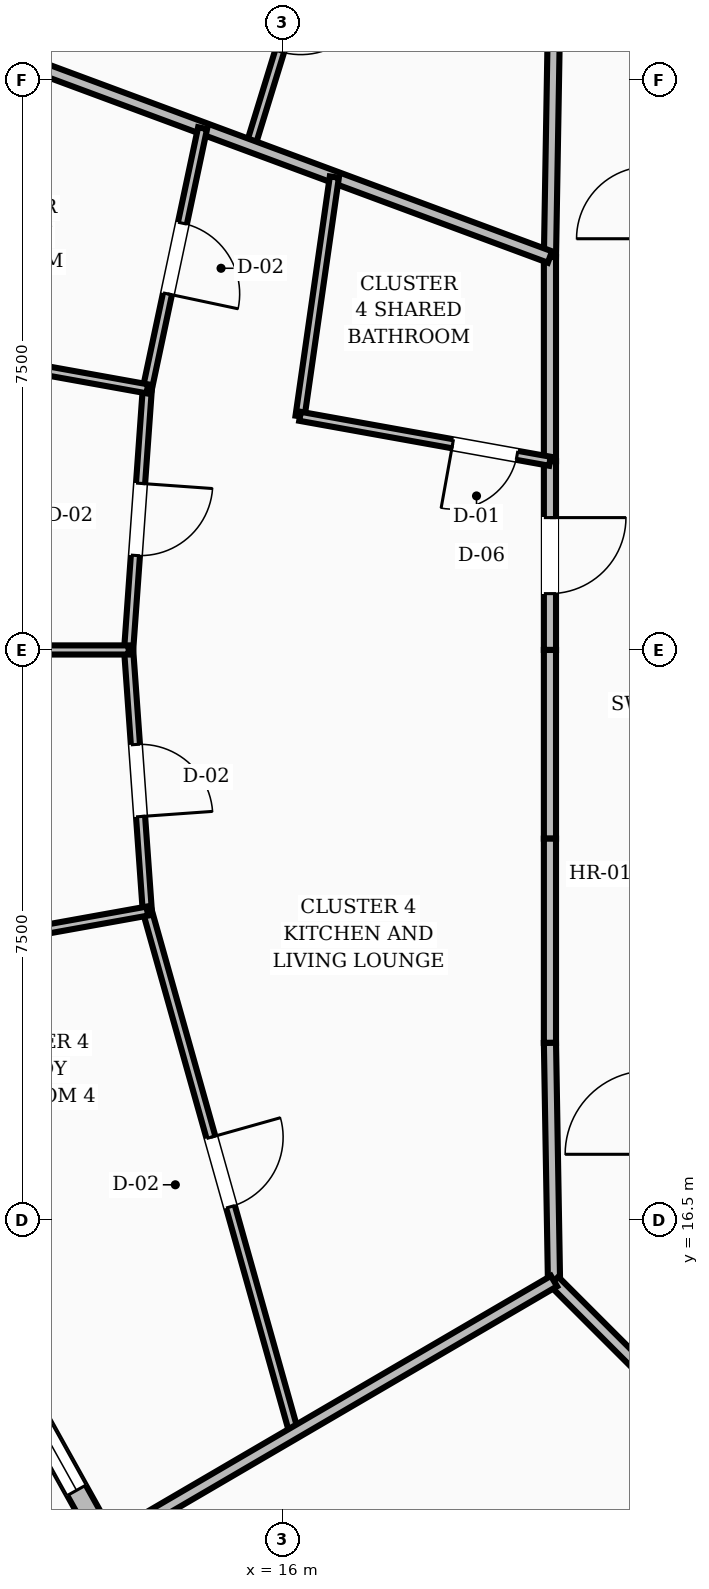
"""IFC4 building model, lengths in metres.
Left out: names, types, materials, properties, quantities, classifications, styles, units other than length and angle.
Written with IfcOpenShell. Run it as: python <this file> out.ifc"""

import sys

from ifc_helpers import new_model, si_unit, direction, frame, frame_2d, origin, place, context, subcontext, project, spatial, rectangle, extrude, element, fill, save


model = new_model("IFC4")
c1 = context("Model", 3, precision=1e-05, world=origin(), true_north=direction((0.0, 1.0)))
c2 = subcontext(c1, "Body", "Model", "MODEL_VIEW")
j1 = project(units=[si_unit("LENGTHUNIT", "METRE"), si_unit("PLANEANGLEUNIT", "RADIAN")], contexts=[c1])
p1 = place(None, origin())
s1 = spatial("IfcSite", under=j1, at=p1, CompositionType="ELEMENT")
p2 = place(p1, origin())
s2 = spatial("IfcBuilding", under=s1, at=p2, CompositionType="ELEMENT")
p3 = place(p2, frame((0.0, 0.0, 236.4)))
s3 = spatial("IfcBuildingStorey", under=s2, at=p3, CompositionType="ELEMENT", Elevation=236.4)
p4 = place(p3, frame((11.641, 15.908, 0.0), z_axis=(0.0, 0.0, 1.0), x_axis=(0.486628377496, -0.873609078602, 0.0)))
e1 = element("IfcWall", 1, at=p4, inside=s3, PredefinedType="STANDARD", context=c2, shape_type="SweptSolid", body=[
    extrude(rectangle(XDim=4.185, YDim=0.28, at=frame_2d((2.092, 0.0))), origin(), (0.0, 0.0, 1.0), 2.88),
])
p5 = place(p4, frame((0.792, 0.0, 0.8)))
e2 = element("IfcOpeningElement", 2, at=p5, cuts=e1, PredefinedType="OPENING", context=c2, shape_type="SweptSolid", body=[
    extrude(rectangle(XDim=2.6, YDim=1.65, at=frame_2d((1.3, 0.825))), frame((0.0, 0.15, 0.0), z_axis=(0.0, -1.0, 0.0), x_axis=(1.0, 0.0, 0.0)), (0.0, 0.0, 1.0), 0.3),
])
p6 = place(p3, frame((19.573, 32.303, 0.0), z_axis=(0.0, 0.0, 1.0), x_axis=(-0.016981035134, -0.999855811828, 0.0)))
e3 = element("IfcWall", 3, at=p6, inside=s3, PredefinedType="SOLIDWALL", context=c2, shape_type="SweptSolid", body=[
    extrude(rectangle(XDim=3.134, YDim=0.16, at=frame_2d((1.567, 0.0))), origin(), (0.0, 0.0, 1.0), 2.87),
])
p7 = place(p3, frame((19.52, 29.169, 0.0), z_axis=(0.0, 0.0, 1.0), x_axis=(0.0, -1.0, 0.0)))
e4 = element("IfcWall", 4, at=p7, inside=s3, PredefinedType="SOLIDWALL", context=c2, shape_type="SweptSolid", body=[
    extrude(rectangle(XDim=2.687, YDim=0.16, at=frame_2d((1.344, 0.0))), origin(), (0.0, 0.0, 1.0), 2.87),
])
p8 = place(p3, frame((19.52, 26.482, 0.0), z_axis=(0.0, 0.0, 1.0), x_axis=(0.0, -1.0, 0.0)))
e5 = element("IfcWall", 5, at=p8, inside=s3, PredefinedType="SOLIDWALL", context=c2, shape_type="SweptSolid", body=[
    extrude(rectangle(XDim=2.482, YDim=0.16, at=frame_2d((1.241, 0.0))), origin(), (0.0, 0.0, 1.0), 2.87),
])
p9 = place(p8, frame((0.741, 0.0, 0.0)))
e6 = element("IfcOpeningElement", 6, at=p9, cuts=e5, PredefinedType="OPENING", context=c2, shape_type="SweptSolid", body=[
    extrude(rectangle(XDim=1.0, YDim=2.1, at=frame_2d((0.5, 1.05))), frame((0.0, 0.09, 0.0), z_axis=(0.0, -1.0, 0.0), x_axis=(1.0, 0.0, 0.0)), (0.0, 0.0, 1.0), 0.18),
])
p10 = place(p3, frame((19.52, 24.0, 0.0), z_axis=(0.0, 0.0, 1.0), x_axis=(0.0, -1.0, 0.0)))
e7 = element("IfcWall", 7, at=p10, inside=s3, PredefinedType="SOLIDWALL", context=c2, shape_type="SweptSolid", body=[
    extrude(rectangle(XDim=2.482, YDim=0.16, at=frame_2d((1.241, 0.0))), origin(), (0.0, 0.0, 1.0), 2.87),
])
p11 = place(p3, frame((19.52, 21.518, 0.0), z_axis=(0.0, 0.0, 1.0), x_axis=(0.0, -1.0, 0.0)))
e8 = element("IfcWall", 8, at=p11, inside=s3, PredefinedType="SOLIDWALL", context=c2, shape_type="SweptSolid", body=[
    extrude(rectangle(XDim=2.687, YDim=0.16, at=frame_2d((1.344, 0.0))), origin(), (0.0, 0.0, 1.0), 2.87),
])
p12 = place(p3, frame((19.52, 18.831, 0.0), z_axis=(0.0, 0.0, 1.0), x_axis=(0.016981035134, -0.999855811828, 0.0)))
e9 = element("IfcWall", 9, at=p12, inside=s3, PredefinedType="SOLIDWALL", context=c2, shape_type="SweptSolid", body=[
    extrude(rectangle(XDim=3.134, YDim=0.16, at=frame_2d((1.567, 0.0))), origin(), (0.0, 0.0, 1.0), 2.87),
])
p13 = place(p3, frame((19.573, 15.697, 0.0), z_axis=(0.0, 0.0, 1.0), x_axis=(0.707106781187, -0.707106781187, 0.0)))
e10 = element("IfcWall", 10, at=p13, inside=s3, PredefinedType="SOLIDWALL", context=c2, shape_type="SweptSolid", body=[
    extrude(rectangle(XDim=2.916, YDim=0.16, at=frame_2d((1.458, 0.0))), origin(), (0.0, 0.0, 1.0), 2.87),
])
p14 = place(p3, frame((16.625, 34.026, 0.0), z_axis=(0.0, 0.0, 1.0), x_axis=(-0.294182446775, -0.955749280936, 0.0)))
e11 = element("IfcWall", 11, at=p14, inside=s3, PredefinedType="PARTITIONING", context=c2, shape_type="SweptSolid", body=[
    extrude(rectangle(XDim=3.552, YDim=0.12, at=frame_2d((1.776, 0.0))), origin(), (0.0, 0.0, 1.0), 2.87),
])
p15 = place(p14, frame((1.301, 0.0, 0.0)))
e12 = element("IfcOpeningElement", 12, at=p15, cuts=e11, PredefinedType="OPENING", context=c2, shape_type="SweptSolid", body=[
    extrude(rectangle(XDim=0.95, YDim=2.1, at=frame_2d((0.475, 1.05))), frame((0.0, 0.07, 0.0), z_axis=(0.0, -1.0, 0.0), x_axis=(1.0, 0.0, 0.0)), (0.0, 0.0, 1.0), 0.14),
])
p16 = place(p3, frame((19.52, 29.169, 0.0), z_axis=(0.0, 0.0, 1.0), x_axis=(-0.93756283665, 0.347815938871, 0.0)))
e13 = element("IfcWall", 13, at=p16, inside=s3, PredefinedType="SOLIDWALL", context=c2, shape_type="SweptSolid", body=[
    extrude(rectangle(XDim=8.354, YDim=0.16, at=frame_2d((4.177, 0.0))), origin(), (0.0, 0.0, 1.0), 2.87),
])
p17 = place(p3, frame((16.684, 30.222, 0.0), z_axis=(0.0, 0.0, 1.0), x_axis=(-0.141958767182, -0.989872571809, 0.0)))
e14 = element("IfcWall", 14, at=p17, inside=s3, PredefinedType="PARTITIONING", context=c2, shape_type="SweptSolid", body=[
    extrude(rectangle(XDim=3.18, YDim=0.12, at=frame_2d((1.59, 0.0))), origin(), (0.0, 0.0, 1.0), 2.87),
])
p18 = place(p3, frame((19.52, 26.482, 0.0), z_axis=(0.0, 0.0, 1.0), x_axis=(-0.984196827571, 0.177077961922, 0.0)))
e15 = element("IfcWall", 15, at=p18, inside=s3, PredefinedType="PARTITIONING", context=c2, shape_type="SweptSolid", body=[
    extrude(rectangle(XDim=3.341, YDim=0.12, at=frame_2d((1.67, 0.0))), origin(), (0.0, 0.0, 1.0), 2.87),
])
p19 = place(p18, frame((0.44, 0.0, 0.0)))
e16 = element("IfcOpeningElement", 16, at=p19, cuts=e15, PredefinedType="OPENING", context=c2, shape_type="SweptSolid", body=[
    extrude(rectangle(XDim=0.86, YDim=2.1, at=frame_2d((0.43, 1.05))), frame((0.0, 0.07, 0.0), z_axis=(0.0, -1.0, 0.0), x_axis=(1.0, 0.0, 0.0)), (0.0, 0.0, 1.0), 0.14),
])
p20 = place(p3, frame((14.95, 30.865, 0.0), z_axis=(0.0, 0.0, 1.0), x_axis=(-0.207459780038, -0.978243548237, 0.0)))
e17 = element("IfcWall", 17, at=p20, inside=s3, PredefinedType="PARTITIONING", context=c2, shape_type="SweptSolid", body=[
    extrude(rectangle(XDim=3.506, YDim=0.12, at=frame_2d((1.753, 0.0))), origin(), (0.0, 0.0, 1.0), 2.87),
])
p21 = place(p20, frame((1.278, 0.0, 0.0)))
e18 = element("IfcOpeningElement", 18, at=p21, cuts=e17, PredefinedType="OPENING", context=c2, shape_type="SweptSolid", body=[
    extrude(rectangle(XDim=0.95, YDim=2.1, at=frame_2d((0.475, 1.05))), frame((0.0, 0.07, 0.0), z_axis=(0.0, -1.0, 0.0), x_axis=(1.0, 0.0, 0.0)), (0.0, 0.0, 1.0), 0.14),
])
p22 = place(p3, frame((14.223, 27.435, 0.0), z_axis=(0.0, 0.0, 1.0), x_axis=(-0.071312539547, -0.997454019844, 0.0)))
e19 = element("IfcWall", 19, at=p22, inside=s3, PredefinedType="PARTITIONING", context=c2, shape_type="SweptSolid", body=[
    extrude(rectangle(XDim=3.444, YDim=0.12, at=frame_2d((1.722, 0.0))), origin(), (0.0, 0.0, 1.0), 2.87),
])
p23 = place(p22, frame((1.247, 0.0, 0.0)))
e20 = element("IfcOpeningElement", 20, at=p23, cuts=e19, PredefinedType="OPENING", context=c2, shape_type="SweptSolid", body=[
    extrude(rectangle(XDim=0.95, YDim=2.1, at=frame_2d((0.475, 1.05))), frame((0.0, 0.07, 0.0), z_axis=(0.0, -1.0, 0.0), x_axis=(1.0, 0.0, 0.0)), (0.0, 0.0, 1.0), 0.14),
])
p24 = place(p3, frame((14.223, 27.435, 0.0), z_axis=(0.0, 0.0, 1.0), x_axis=(-0.984203232283, 0.177042360933, 0.0)))
e21 = element("IfcWall", 21, at=p24, inside=s3, PredefinedType="PARTITIONING", context=c2, shape_type="SweptSolid", body=[
    extrude(rectangle(XDim=3.847, YDim=0.12, at=frame_2d((1.924, 0.0))), origin(), (0.0, 0.0, 1.0), 2.87),
])
p25 = place(p3, frame((13.977, 24.0, 0.0), z_axis=(0.0, 0.0, 1.0), x_axis=(0.071312539547, -0.997454019844, 0.0)))
e22 = element("IfcWall", 22, at=p25, inside=s3, PredefinedType="PARTITIONING", context=c2, shape_type="SweptSolid", body=[
    extrude(rectangle(XDim=3.444, YDim=0.12, at=frame_2d((1.722, 0.0))), origin(), (0.0, 0.0, 1.0), 2.87),
])
p26 = place(p25, frame((1.247, 0.0, 0.0)))
e23 = element("IfcOpeningElement", 23, at=p26, cuts=e22, PredefinedType="OPENING", context=c2, shape_type="SweptSolid", body=[
    extrude(rectangle(XDim=0.95, YDim=2.1, at=frame_2d((0.475, 1.05))), frame((0.0, 0.07, 0.0), z_axis=(0.0, -1.0, 0.0), x_axis=(1.0, 0.0, 0.0)), (0.0, 0.0, 1.0), 0.14),
])
p27 = place(p3, frame((13.977, 24.0, 0.0), z_axis=(0.0, 0.0, 1.0), x_axis=(-1.0, 0.0, 0.0)))
e24 = element("IfcWall", 24, at=p27, inside=s3, PredefinedType="PARTITIONING", context=c2, shape_type="SweptSolid", body=[
    extrude(rectangle(XDim=3.964, YDim=0.12, at=frame_2d((1.982, 0.0))), origin(), (0.0, 0.0, 1.0), 2.87),
])
p28 = place(p3, frame((14.223, 20.565, 0.0), z_axis=(0.0, 0.0, 1.0), x_axis=(0.270726742506, -0.962656237134, 0.0)))
e25 = element("IfcWall", 25, at=p28, inside=s3, PredefinedType="PARTITIONING", context=c2, shape_type="SweptSolid", body=[
    extrude(rectangle(XDim=7.132, YDim=0.12, at=frame_2d((3.566, 0.0))), origin(), (0.0, 0.0, 1.0), 2.87),
])
p29 = place(p28, frame((3.091, 0.0, 0.0)))
e26 = element("IfcOpeningElement", 26, at=p29, cuts=e25, PredefinedType="OPENING", context=c2, shape_type="SweptSolid", body=[
    extrude(rectangle(XDim=0.95, YDim=2.1, at=frame_2d((0.475, 1.05))), frame((0.0, 0.07, 0.0), z_axis=(0.0, -1.0, 0.0), x_axis=(1.0, 0.0, 0.0)), (0.0, 0.0, 1.0), 0.14),
])
p30 = place(p3, frame((14.223, 20.565, 0.0), z_axis=(0.0, 0.0, 1.0), x_axis=(-0.984203232283, -0.177042360933, 0.0)))
e27 = element("IfcWall", 27, at=p30, inside=s3, PredefinedType="PARTITIONING", context=c2, shape_type="SweptSolid", body=[
    extrude(rectangle(XDim=3.847, YDim=0.12, at=frame_2d((1.924, 0.0))), origin(), (0.0, 0.0, 1.0), 2.87),
])
p31 = place(p3, frame((19.573, 15.697, 0.0), z_axis=(0.0, 0.0, 1.0), x_axis=(-0.863412899141, -0.504497934185, 0.0)))
e28 = element("IfcWall", 28, at=p31, inside=s3, PredefinedType="SOLIDWALL", context=c2, shape_type="SweptSolid", body=[
    extrude(rectangle(XDim=6.778, YDim=0.16, at=frame_2d((3.389, 0.0))), origin(), (0.0, 0.0, 1.0), 2.87),
])
p32 = place(p5, origin())
e29 = element("IfcWindow", 29, at=p32, inside=s3, PartitioningType="SINGLE_PANEL", PredefinedType="WINDOW", context=c2, shape_type="SweptSolid", body=[
    extrude(rectangle(XDim=2.6, YDim=1.65, at=frame_2d((1.3, 0.825))), frame((0.0, 0.03, 0.0), z_axis=(0.0, -1.0, 0.0), x_axis=(1.0, 0.0, 0.0)), (0.0, 0.0, 1.0), 0.06),
])
fill(e2, e29)
p33 = place(p19, origin())
e30 = element("IfcDoor", 30, at=p33, inside=s3, OperationType="SINGLE_SWING_RIGHT", PredefinedType="DOOR", context=c2, shape_type="SweptSolid", body=[
    extrude(rectangle(XDim=0.86, YDim=2.1, at=frame_2d((0.43, 1.05))), frame((0.0, 0.025, 0.0), z_axis=(0.0, -1.0, 0.0), x_axis=(1.0, 0.0, 0.0)), (0.0, 0.0, 1.0), 0.05),
])
fill(e16, e30)
p34 = place(p9, origin())
e31 = element("IfcDoor", 31, at=p34, inside=s3, OperationType="SINGLE_SWING_LEFT", PredefinedType="DOOR", context=c2, shape_type="SweptSolid", body=[
    extrude(rectangle(XDim=1.0, YDim=2.1, at=frame_2d((0.5, 1.05))), frame((0.0, 0.025, 0.0), z_axis=(0.0, -1.0, 0.0), x_axis=(1.0, 0.0, 0.0)), (0.0, 0.0, 1.0), 0.05),
])
fill(e6, e31)
p35 = place(p21, origin())
e32 = element("IfcDoor", 32, at=p35, inside=s3, OperationType="SINGLE_SWING_RIGHT", PredefinedType="DOOR", context=c2, shape_type="SweptSolid", body=[
    extrude(rectangle(XDim=0.95, YDim=2.1, at=frame_2d((0.475, 1.05))), frame((0.0, 0.025, 0.0), z_axis=(0.0, -1.0, 0.0), x_axis=(1.0, 0.0, 0.0)), (0.0, 0.0, 1.0), 0.05),
])
fill(e18, e32)
p36 = place(p23, origin())
e33 = element("IfcDoor", 33, at=p36, inside=s3, OperationType="SINGLE_SWING_LEFT", PredefinedType="DOOR", context=c2, shape_type="SweptSolid", body=[
    extrude(rectangle(XDim=0.95, YDim=2.1, at=frame_2d((0.475, 1.05))), frame((0.0, 0.025, 0.0), z_axis=(0.0, -1.0, 0.0), x_axis=(1.0, 0.0, 0.0)), (0.0, 0.0, 1.0), 0.05),
])
fill(e20, e33)
p37 = place(p26, origin())
e34 = element("IfcDoor", 34, at=p37, inside=s3, OperationType="SINGLE_SWING_RIGHT", PredefinedType="DOOR", context=c2, shape_type="SweptSolid", body=[
    extrude(rectangle(XDim=0.95, YDim=2.1, at=frame_2d((0.475, 1.05))), frame((0.0, 0.025, 0.0), z_axis=(0.0, -1.0, 0.0), x_axis=(1.0, 0.0, 0.0)), (0.0, 0.0, 1.0), 0.05),
])
fill(e23, e34)
p38 = place(p29, origin())
e35 = element("IfcDoor", 35, at=p38, inside=s3, OperationType="SINGLE_SWING_LEFT", PredefinedType="DOOR", context=c2, shape_type="SweptSolid", body=[
    extrude(rectangle(XDim=0.95, YDim=2.1, at=frame_2d((0.475, 1.05))), frame((0.0, 0.025, 0.0), z_axis=(0.0, -1.0, 0.0), x_axis=(1.0, 0.0, 0.0)), (0.0, 0.0, 1.0), 0.05),
])
fill(e26, e35)
save(model, sys.argv[1])
